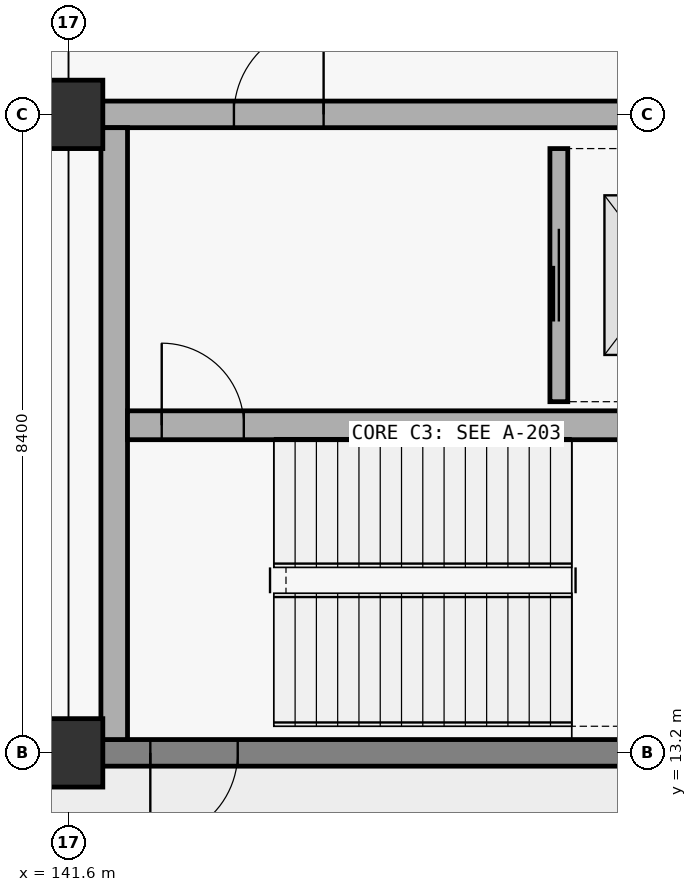
"""IFC4 building model, lengths in metres.
Left out: names, types, materials, properties, quantities, classifications, styles, units other than length and angle.
Written with IfcOpenShell. Run it as: python <this file> out.ifc"""

import sys

from ifc_helpers import new_model, si_unit, direction, frame, frame_2d, origin, origin_2d, place, context, subcontext, project, spatial, rectangle, extrude, element, fill, save


model = new_model("IFC4")
c1 = context("Model", 3, precision=1e-05, world=origin(), true_north=direction((0.0, 1.0)))
c2 = subcontext(c1, "Body", "Model", "MODEL_VIEW")
j1 = project(units=[si_unit("LENGTHUNIT", "METRE"), si_unit("PLANEANGLEUNIT", "RADIAN")], contexts=[c1])
p1 = place(None, origin())
s1 = spatial("IfcSite", under=j1, at=p1, CompositionType="ELEMENT")
p2 = place(p1, origin())
s2 = spatial("IfcBuilding", under=s1, at=p2, CompositionType="ELEMENT")
p3 = place(p2, origin())
s3 = spatial("IfcBuildingStorey", under=s2, at=p3, CompositionType="ELEMENT", Elevation=0.0)
for number, where, z_axis, x_axis in (
    (1, (141.6, 13.2, 0.0), (0.0, 0.0, 1.0), (1.0, 0.0, 0.0)),
    (2, (141.6, 21.6, 0.0), (0.0, 0.0, 1.0), (1.0, 0.0, 0.0)),
):
    element("IfcColumn", number, at=place(p3, frame(where, z_axis=z_axis, x_axis=x_axis)), inside=s3, PredefinedType="COLUMN", context=c2, shape_type="SweptSolid", body=[
        extrude(rectangle(XDim=0.9, YDim=0.9, at=origin_2d()), origin(), (0.0, 0.0, 1.0), 5.4),
    ])
p4 = place(p3, frame((151.375, 13.2, 0.0), z_axis=(0.0, 0.0, 1.0), x_axis=(-1.0, 0.0, 0.0)))
e3 = element("IfcWall", 3, at=p4, inside=s3, PredefinedType="SHEAR", context=c2, shape_type="SweptSolid", body=[
    extrude(rectangle(XDim=9.35, YDim=0.35, at=frame_2d((4.675, 0.0))), origin(), (0.0, 0.0, 1.0), 5.4),
])
p5 = place(p4, frame((7.55, 0.0, 0.0)))
e4 = element("IfcOpeningElement", 4, at=p5, cuts=e3, PredefinedType="OPENING", context=c2, shape_type="SweptSolid", body=[
    extrude(rectangle(XDim=1.15, YDim=2.2, at=frame_2d((0.575, 1.1))), frame((0.0, 0.185, 0.0), z_axis=(0.0, -1.0, 0.0), x_axis=(1.0, 0.0, 0.0)), (0.0, 0.0, 1.0), 0.37),
])
p6 = place(p3, frame((142.025, 21.6, 0.0), z_axis=(0.0, 0.0, 1.0), x_axis=(1.0, 0.0, 0.0)))
e5 = element("IfcWall", 5, at=p6, inside=s3, PredefinedType="SHEAR", context=c2, shape_type="SweptSolid", body=[
    extrude(rectangle(XDim=9.35, YDim=0.35, at=frame_2d((4.675, 0.0))), origin(), (0.0, 0.0, 1.0), 5.4),
])
p7 = place(p6, frame((1.75, 0.0, 0.0)))
e6 = element("IfcOpeningElement", 6, at=p7, cuts=e5, PredefinedType="OPENING", context=c2, shape_type="SweptSolid", body=[
    extrude(rectangle(XDim=1.18, YDim=2.24, at=frame_2d((0.59, 1.12))), frame((0.0, 0.185, 0.0), z_axis=(0.0, -1.0, 0.0), x_axis=(1.0, 0.0, 0.0)), (0.0, 0.0, 1.0), 0.37),
])
p8 = place(p3, frame((142.2, 13.375, 0.0), z_axis=(0.0, 0.0, 1.0), x_axis=(0.0, 1.0, 0.0)))
e7 = element("IfcWall", 7, at=p8, inside=s3, PredefinedType="SHEAR", context=c2, shape_type="SweptSolid", body=[
    extrude(rectangle(XDim=8.05, YDim=0.35, at=frame_2d((4.025, 0.0))), origin(), (0.0, 0.0, 1.0), 5.4),
])
p9 = place(p3, frame((142.375, 17.51, 0.0), z_axis=(0.0, 0.0, 1.0), x_axis=(1.0, 0.0, 0.0)))
e8 = element("IfcWall", 8, at=p9, inside=s3, PredefinedType="SHEAR", context=c2, shape_type="SweptSolid", body=[
    extrude(rectangle(XDim=8.65, YDim=0.38, at=frame_2d((4.325, 0.0))), origin(), (0.0, 0.0, 1.0), 5.4),
])
p10 = place(p9, frame((0.45, 0.0, 0.0)))
e9 = element("IfcOpeningElement", 9, at=p10, cuts=e8, PredefinedType="OPENING", context=c2, shape_type="SweptSolid", body=[
    extrude(rectangle(XDim=1.08, YDim=2.18, at=frame_2d((0.54, 1.09))), frame((0.0, 0.2, 0.0), z_axis=(0.0, -1.0, 0.0), x_axis=(1.0, 0.0, 0.0)), (0.0, 0.0, 1.0), 0.4),
])
p11 = place(p3, frame((148.05, 17.82, 0.0), z_axis=(0.0, 0.0, 1.0), x_axis=(0.0, 1.0, 0.0)))
e10 = element("IfcWall", 10, at=p11, inside=s3, PredefinedType="PARTITIONING", context=c2, shape_type="SweptSolid", body=[
    extrude(rectangle(XDim=3.33, YDim=0.235, at=frame_2d((1.665, 0.0))), origin(), (0.0, 0.0, 1.0), 4.09),
])
p12 = place(p11, frame((1.055, 0.0, 0.0)))
e11 = element("IfcOpeningElement", 11, at=p12, cuts=e10, PredefinedType="OPENING", context=c2, shape_type="SweptSolid", body=[
    extrude(rectangle(XDim=1.22, YDim=2.24, at=frame_2d((0.61, 1.12))), frame((0.0, 0.127, 0.0), z_axis=(0.0, -1.0, 0.0), x_axis=(1.0, 0.0, 0.0)), (0.0, 0.0, 1.0), 0.255),
])
p13 = place(p5, origin())
e12 = element("IfcDoor", 12, at=p13, inside=s3, OperationType="SINGLE_SWING_RIGHT", PredefinedType="DOOR", context=c2, shape_type="SweptSolid", body=[
    extrude(rectangle(XDim=1.15, YDim=2.2, at=frame_2d((0.575, 1.1))), frame((0.0, 0.025, 0.0), z_axis=(0.0, -1.0, 0.0), x_axis=(1.0, 0.0, 0.0)), (0.0, 0.0, 1.0), 0.05),
])
fill(e4, e12)
p14 = place(p10, origin())
e13 = element("IfcDoor", 13, at=p14, inside=s3, OperationType="SINGLE_SWING_LEFT", PredefinedType="DOOR", context=c2, shape_type="SweptSolid", body=[
    extrude(rectangle(XDim=1.08, YDim=2.18, at=frame_2d((0.54, 1.09))), frame((0.0, 0.025, 0.0), z_axis=(0.0, -1.0, 0.0), x_axis=(1.0, 0.0, 0.0)), (0.0, 0.0, 1.0), 0.05),
])
fill(e9, e13)
p15 = place(p7, origin())
e14 = element("IfcDoor", 14, at=p15, inside=s3, OperationType="SINGLE_SWING_RIGHT", PredefinedType="DOOR", context=c2, shape_type="SweptSolid", body=[
    extrude(rectangle(XDim=1.18, YDim=2.24, at=frame_2d((0.59, 1.12))), frame((0.0, 0.025, 0.0), z_axis=(0.0, -1.0, 0.0), x_axis=(1.0, 0.0, 0.0)), (0.0, 0.0, 1.0), 0.05),
])
fill(e6, e14)
p16 = place(p12, origin())
e15 = element("IfcDoor", 15, at=p16, inside=s3, OperationType="SLIDING_TO_RIGHT", PredefinedType="DOOR", context=c2, shape_type="SweptSolid", body=[
    extrude(rectangle(XDim=1.22, YDim=2.24, at=frame_2d((0.61, 1.12))), frame((0.0, 0.025, 0.0), z_axis=(0.0, -1.0, 0.0), x_axis=(1.0, 0.0, 0.0)), (0.0, 0.0, 1.0), 0.05),
])
fill(e11, e15)
save(model, sys.argv[1])
